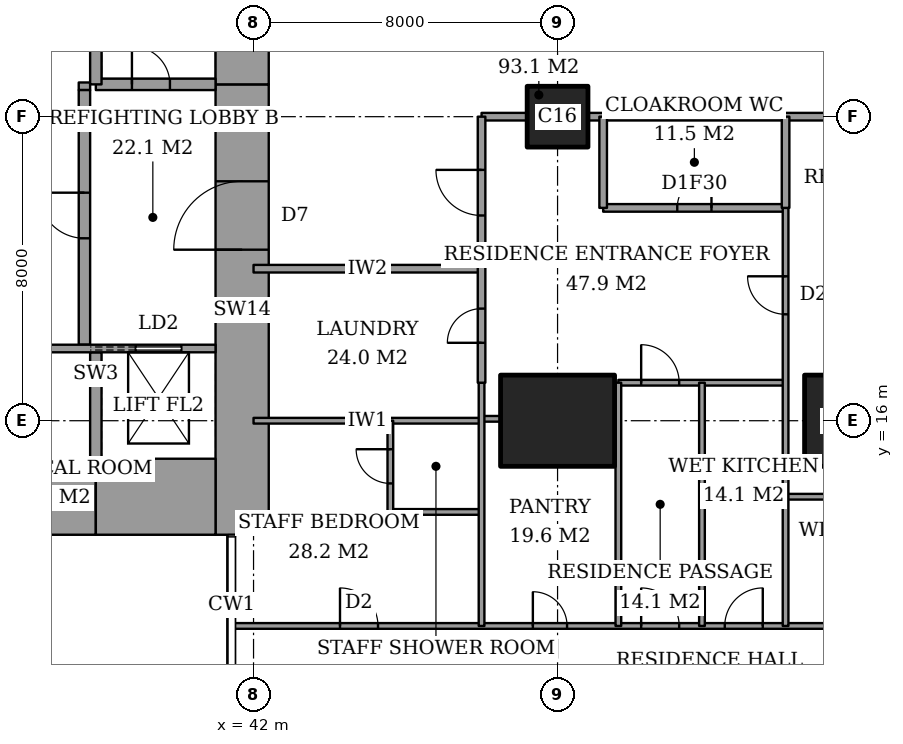
"""IFC4 building model, lengths in metres.
Left out: names, types, materials, properties, quantities, classifications, styles, units other than length and angle.
Written with IfcOpenShell. Run it as: python <this file> out.ifc"""

import sys

from ifc_helpers import new_model, si_unit, direction, frame, frame_2d, origin, origin_2d, place, context, subcontext, project, spatial, rectangle, extrude, element, fill, save


model = new_model("IFC4")
c1 = context("Model", 3, precision=1e-05, world=origin(), true_north=direction((0.0, 1.0)))
c2 = subcontext(c1, "Body", "Model", "MODEL_VIEW")
j1 = project(units=[si_unit("LENGTHUNIT", "METRE"), si_unit("PLANEANGLEUNIT", "RADIAN")], contexts=[c1])
p1 = place(None, origin())
s1 = spatial("IfcSite", under=j1, at=p1, CompositionType="ELEMENT")
p2 = place(p1, origin())
s2 = spatial("IfcBuilding", under=s1, at=p2, CompositionType="ELEMENT")
p3 = place(p2, frame((0.0, 0.0, 273.6)))
s3 = spatial("IfcBuildingStorey", under=s2, at=p3, CompositionType="ELEMENT", Elevation=273.6)
p4 = place(p3, frame((50.0, 16.0, 0.0), z_axis=(0.0, 0.0, 1.0), x_axis=(1.0, 0.0, 0.0)))
e1 = element("IfcColumn", 1, at=p4, inside=s3, PredefinedType="COLUMN", context=c2, shape_type="SweptSolid", body=[
    extrude(rectangle(XDim=3.0, YDim=2.4, at=origin_2d()), origin(), (0.0, 0.0, 1.0), 3.6),
])
p5 = place(p3, frame((50.0, 24.0, 0.0), z_axis=(0.0, 0.0, 1.0), x_axis=(1.0, 0.0, 0.0)))
e2 = element("IfcColumn", 2, at=p5, inside=s3, PredefinedType="COLUMN", context=c2, shape_type="SweptSolid", body=[
    extrude(rectangle(XDim=1.6, YDim=1.6, at=origin_2d()), origin(), (0.0, 0.0, 1.0), 3.6),
])
p6 = place(p3, frame((58.0, 16.0, 0.0), z_axis=(0.0, 0.0, 1.0), x_axis=(1.0, 0.0, 0.0)))
e3 = element("IfcColumn", 3, at=p6, inside=s3, PredefinedType="COLUMN", context=c2, shape_type="SweptSolid", body=[
    extrude(rectangle(XDim=3.0, YDim=2.4, at=origin_2d()), origin(), (0.0, 0.0, 1.0), 3.6),
])
p7 = place(p3, frame((28.15, 14.0, 0.0), z_axis=(0.0, 0.0, 1.0), x_axis=(1.0, 0.0, 0.0)))
e4 = element("IfcWall", 4, at=p7, inside=s3, PredefinedType="SHEAR", context=c2, shape_type="SweptSolid", body=[
    extrude(rectangle(XDim=9.7, YDim=2.0, at=frame_2d((4.85, 0.0))), origin(), (0.0, 0.0, 1.0), 3.6),
])
p8 = place(p3, frame((37.85, 14.0, 0.0), z_axis=(0.0, 0.0, 1.0), x_axis=(1.0, 0.0, 0.0)))
e5 = element("IfcWall", 5, at=p8, inside=s3, PredefinedType="SHEAR", context=c2, shape_type="SweptSolid", body=[
    extrude(rectangle(XDim=3.15, YDim=2.0, at=frame_2d((1.575, 0.0))), origin(), (0.0, 0.0, 1.0), 3.6),
])
p9 = place(p3, frame((41.7, 13.0, 0.0), z_axis=(0.0, 0.0, 1.0), x_axis=(0.0, 1.0, 0.0)))
e6 = element("IfcWall", 6, at=p9, inside=s3, PredefinedType="SHEAR", context=c2, shape_type="SweptSolid", body=[
    extrude(rectangle(XDim=11.85, YDim=1.4, at=frame_2d((5.925, 0.0))), origin(), (0.0, 0.0, 1.0), 3.6),
])
p10 = place(p9, frame((7.5, 0.0, 0.0)))
e7 = element("IfcOpeningElement", 7, at=p10, cuts=e6, PredefinedType="OPENING", context=c2, shape_type="SweptSolid", body=[
    extrude(rectangle(XDim=1.8, YDim=2.4, at=frame_2d((0.9, 1.2))), frame((0.0, 0.71, 0.0), z_axis=(0.0, -1.0, 0.0), x_axis=(1.0, 0.0, 0.0)), (0.0, 0.0, 1.0), 1.42),
])
p11 = place(p3, frame((41.7, 24.85, 0.0), z_axis=(0.0, 0.0, 1.0), x_axis=(0.0, 1.0, 0.0)))
e8 = element("IfcWall", 8, at=p11, inside=s3, PredefinedType="SHEAR", context=c2, shape_type="SweptSolid", body=[
    extrude(rectangle(XDim=10.15, YDim=1.4, at=frame_2d((5.075, 0.0))), origin(), (0.0, 0.0, 1.0), 3.6),
])
p12 = place(p3, frame((37.85, 24.85, 0.0), z_axis=(0.0, 0.0, 1.0), x_axis=(0.0, 1.0, 0.0)))
e9 = element("IfcWall", 9, at=p12, inside=s3, PredefinedType="SHEAR", context=c2, shape_type="SweptSolid", body=[
    extrude(rectangle(XDim=8.15, YDim=0.3, at=frame_2d((4.075, 0.0))), origin(), (0.0, 0.0, 1.0), 3.6),
])
p13 = place(p3, frame((37.85, 24.85, 0.0), z_axis=(0.0, 0.0, 1.0), x_axis=(1.0, 0.0, 0.0)))
e10 = element("IfcWall", 10, at=p13, inside=s3, PredefinedType="SHEAR", context=c2, shape_type="SweptSolid", body=[
    extrude(rectangle(XDim=3.15, YDim=0.3, at=frame_2d((1.575, 0.0))), origin(), (0.0, 0.0, 1.0), 3.6),
])
p14 = place(p13, frame((0.95, 0.0, 0.0)))
e11 = element("IfcOpeningElement", 11, at=p14, cuts=e10, PredefinedType="OPENING", context=c2, shape_type="SweptSolid", body=[
    extrude(rectangle(XDim=1.0, YDim=2.1, at=frame_2d((0.5, 1.05))), frame((0.0, 0.16, 0.0), z_axis=(0.0, -1.0, 0.0), x_axis=(1.0, 0.0, 0.0)), (0.0, 0.0, 1.0), 0.32),
])
p15 = place(p3, frame((37.55, 18.0, 0.0), z_axis=(0.0, 0.0, 1.0), x_axis=(0.0, 1.0, 0.0)))
e12 = element("IfcWall", 12, at=p15, inside=s3, PredefinedType="PARTITIONING", context=c2, shape_type="SweptSolid", body=[
    extrude(rectangle(XDim=6.7, YDim=0.3, at=frame_2d((3.35, 0.0))), origin(), (0.0, 0.0, 1.0), 3.6),
])
p16 = place(p15, frame((2.8, 0.0, 0.0)))
e13 = element("IfcOpeningElement", 13, at=p16, cuts=e12, PredefinedType="OPENING", context=c2, shape_type="SweptSolid", body=[
    extrude(rectangle(XDim=1.2, YDim=2.1, at=frame_2d((0.6, 1.05))), frame((0.0, 0.16, 0.0), z_axis=(0.0, -1.0, 0.0), x_axis=(1.0, 0.0, 0.0)), (0.0, 0.0, 1.0), 0.32),
])
p17 = place(p3, frame((41.439, 10.6, 0.0), z_axis=(0.0, 0.0, 1.0), x_axis=(1.0, 0.0, 0.0)))
e14 = element("IfcWall", 14, at=p17, inside=s3, PredefinedType="PARTITIONING", context=c2, shape_type="SweptSolid", body=[
    extrude(rectangle(XDim=25.011, YDim=0.15, at=frame_2d((12.505, 0.0))), origin(), (0.0, 0.0, 1.0), 3.25),
])
p18 = place(p17, frame((10.761, 0.0, 0.0)))
e15 = element("IfcOpeningElement", 15, at=p18, cuts=e14, PredefinedType="OPENING", context=c2, shape_type="SweptSolid", body=[
    extrude(rectangle(XDim=1.0, YDim=2.1, at=frame_2d((0.5, 1.05))), frame((0.0, 0.085, 0.0), z_axis=(0.0, -1.0, 0.0), x_axis=(1.0, 0.0, 0.0)), (0.0, 0.0, 1.0), 0.17),
])
p19 = place(p17, frame((20.924, 0.0, 0.0)))
e16 = element("IfcOpeningElement", 16, at=p19, cuts=e14, PredefinedType="OPENING", context=c2, shape_type="SweptSolid", body=[
    extrude(rectangle(XDim=1.0, YDim=2.1, at=frame_2d((0.5, 1.05))), frame((0.0, 0.085, 0.0), z_axis=(0.0, -1.0, 0.0), x_axis=(1.0, 0.0, 0.0)), (0.0, 0.0, 1.0), 0.17),
])
p20 = place(p17, frame((15.749, 0.0, 0.0)))
e17 = element("IfcOpeningElement", 17, at=p20, cuts=e14, PredefinedType="OPENING", context=c2, shape_type="SweptSolid", body=[
    extrude(rectangle(XDim=0.9, YDim=2.1, at=frame_2d((0.45, 1.05))), frame((0.0, 0.085, 0.0), z_axis=(0.0, -1.0, 0.0), x_axis=(1.0, 0.0, 0.0)), (0.0, 0.0, 1.0), 0.17),
])
p21 = place(p17, frame((12.961, 0.0, 0.0)))
e18 = element("IfcOpeningElement", 18, at=p21, cuts=e14, PredefinedType="OPENING", context=c2, shape_type="SweptSolid", body=[
    extrude(rectangle(XDim=1.0, YDim=2.1, at=frame_2d((0.5, 1.05))), frame((0.0, 0.085, 0.0), z_axis=(0.0, -1.0, 0.0), x_axis=(1.0, 0.0, 0.0)), (0.0, 0.0, 1.0), 0.17),
])
p22 = place(p17, frame((7.911, 0.0, 0.0)))
e19 = element("IfcOpeningElement", 19, at=p22, cuts=e14, PredefinedType="OPENING", context=c2, shape_type="SweptSolid", body=[
    extrude(rectangle(XDim=0.9, YDim=2.1, at=frame_2d((0.45, 1.05))), frame((0.0, 0.085, 0.0), z_axis=(0.0, -1.0, 0.0), x_axis=(1.0, 0.0, 0.0)), (0.0, 0.0, 1.0), 0.17),
])
p23 = place(p17, frame((2.836, 0.0, 0.0)))
e20 = element("IfcOpeningElement", 20, at=p23, cuts=e14, PredefinedType="OPENING", context=c2, shape_type="SweptSolid", body=[
    extrude(rectangle(XDim=1.0, YDim=2.1, at=frame_2d((0.5, 1.05))), frame((0.0, 0.085, 0.0), z_axis=(0.0, -1.0, 0.0), x_axis=(1.0, 0.0, 0.0)), (0.0, 0.0, 1.0), 0.17),
])
p24 = place(p3, frame((45.6, 13.6, 0.0), z_axis=(0.0, 0.0, 1.0), x_axis=(1.0, 0.0, 0.0)))
e21 = element("IfcWall", 21, at=p24, inside=s3, PredefinedType="PARTITIONING", context=c2, shape_type="SweptSolid", body=[
    extrude(rectangle(XDim=2.4, YDim=0.15, at=frame_2d((1.2, 0.0))), origin(), (0.0, 0.0, 1.0), 3.25),
])
p25 = place(p3, frame((56.0, 14.0, 0.0), z_axis=(0.0, 0.0, 1.0), x_axis=(1.0, 0.0, 0.0)))
e22 = element("IfcWall", 22, at=p25, inside=s3, PredefinedType="PARTITIONING", context=c2, shape_type="SweptSolid", body=[
    extrude(rectangle(XDim=3.275, YDim=0.15, at=frame_2d((1.637, 0.0))), origin(), (0.0, 0.0, 1.0), 3.25),
])
p26 = place(p3, frame((42.0, 16.0, 0.0), z_axis=(0.0, 0.0, 1.0), x_axis=(1.0, 0.0, 0.0)))
e23 = element("IfcWall", 23, at=p26, inside=s3, PredefinedType="PARTITIONING", context=c2, shape_type="SweptSolid", body=[
    extrude(rectangle(XDim=6.0, YDim=0.15, at=frame_2d((3.0, 0.0))), origin(), (0.0, 0.0, 1.0), 3.25),
])
p27 = place(p3, frame((48.0, 16.05, 0.0), z_axis=(0.0, 0.0, 1.0), x_axis=(1.0, 0.0, 0.0)))
e24 = element("IfcWall", 24, at=p27, inside=s3, PredefinedType="PARTITIONING", context=c2, shape_type="SweptSolid", body=[
    extrude(rectangle(XDim=0.5, YDim=0.15, at=frame_2d((0.25, 0.0))), origin(), (0.0, 0.0, 1.0), 3.25),
])
p28 = place(p3, frame((51.6, 17.0, 0.0), z_axis=(0.0, 0.0, 1.0), x_axis=(1.0, 0.0, 0.0)))
e25 = element("IfcWall", 25, at=p28, inside=s3, PredefinedType="PARTITIONING", context=c2, shape_type="SweptSolid", body=[
    extrude(rectangle(XDim=4.4, YDim=0.15, at=frame_2d((2.2, 0.0))), origin(), (0.0, 0.0, 1.0), 3.25),
])
p29 = place(p28, frame((0.6, 0.0, 0.0)))
e26 = element("IfcOpeningElement", 26, at=p29, cuts=e25, PredefinedType="OPENING", context=c2, shape_type="SweptSolid", body=[
    extrude(rectangle(XDim=1.0, YDim=2.1, at=frame_2d((0.5, 1.05))), frame((0.0, 0.085, 0.0), z_axis=(0.0, -1.0, 0.0), x_axis=(1.0, 0.0, 0.0)), (0.0, 0.0, 1.0), 0.17),
])
p30 = place(p3, frame((42.0, 20.0, 0.0), z_axis=(0.0, 0.0, 1.0), x_axis=(1.0, 0.0, 0.0)))
e27 = element("IfcWall", 27, at=p30, inside=s3, PredefinedType="PARTITIONING", context=c2, shape_type="SweptSolid", body=[
    extrude(rectangle(XDim=6.0, YDim=0.2, at=frame_2d((3.0, 0.0))), origin(), (0.0, 0.0, 1.0), 3.25),
])
p31 = place(p3, frame((51.2, 21.6, 0.0), z_axis=(0.0, 0.0, 1.0), x_axis=(1.0, 0.0, 0.0)))
e28 = element("IfcWall", 28, at=p31, inside=s3, PredefinedType="PARTITIONING", context=c2, shape_type="SweptSolid", body=[
    extrude(rectangle(XDim=4.8, YDim=0.2, at=frame_2d((2.4, 0.0))), origin(), (0.0, 0.0, 1.0), 3.25),
])
p32 = place(p31, frame((1.95, 0.0, 0.0)))
e29 = element("IfcOpeningElement", 29, at=p32, cuts=e28, PredefinedType="OPENING", context=c2, shape_type="SweptSolid", body=[
    extrude(rectangle(XDim=0.9, YDim=2.1, at=frame_2d((0.45, 1.05))), frame((0.0, 0.11, 0.0), z_axis=(0.0, -1.0, 0.0), x_axis=(1.0, 0.0, 0.0)), (0.0, 0.0, 1.0), 0.22),
])
p33 = place(p3, frame((48.0, 24.0, 0.0), z_axis=(0.0, 0.0, 1.0), x_axis=(1.0, 0.0, 0.0)))
e30 = element("IfcWall", 30, at=p33, inside=s3, PredefinedType="PARTITIONING", context=c2, shape_type="SweptSolid", body=[
    extrude(rectangle(XDim=1.2, YDim=0.2, at=frame_2d((0.6, 0.0))), origin(), (0.0, 0.0, 1.0), 3.25),
])
p34 = place(p3, frame((50.8, 24.0, 0.0), z_axis=(0.0, 0.0, 1.0), x_axis=(1.0, 0.0, 0.0)))
e31 = element("IfcWall", 31, at=p34, inside=s3, PredefinedType="PARTITIONING", context=c2, shape_type="SweptSolid", body=[
    extrude(rectangle(XDim=6.4, YDim=0.2, at=frame_2d((3.2, 0.0))), origin(), (0.0, 0.0, 1.0), 3.25),
])
p35 = place(p3, frame((45.6, 13.6, 0.0), z_axis=(0.0, 0.0, 1.0), x_axis=(0.0, 1.0, 0.0)))
e32 = element("IfcWall", 32, at=p35, inside=s3, PredefinedType="PARTITIONING", context=c2, shape_type="SweptSolid", body=[
    extrude(rectangle(XDim=2.4, YDim=0.15, at=frame_2d((1.2, 0.0))), origin(), (0.0, 0.0, 1.0), 3.25),
])
p36 = place(p35, frame((0.75, 0.0, 0.0)))
e33 = element("IfcOpeningElement", 33, at=p36, cuts=e32, PredefinedType="OPENING", context=c2, shape_type="SweptSolid", body=[
    extrude(rectangle(XDim=0.9, YDim=2.1, at=frame_2d((0.45, 1.05))), frame((0.0, 0.085, 0.0), z_axis=(0.0, -1.0, 0.0), x_axis=(1.0, 0.0, 0.0)), (0.0, 0.0, 1.0), 0.17),
])
p37 = place(p3, frame((48.0, 17.0, 0.0), z_axis=(0.0, 0.0, 1.0), x_axis=(0.0, 1.0, 0.0)))
e34 = element("IfcWall", 34, at=p37, inside=s3, PredefinedType="PARTITIONING", context=c2, shape_type="SweptSolid", body=[
    extrude(rectangle(XDim=7.0, YDim=0.2, at=frame_2d((3.5, 0.0))), origin(), (0.0, 0.0, 1.0), 3.25),
])
p38 = place(p37, frame((4.4, 0.0, 0.0)))
e35 = element("IfcOpeningElement", 35, at=p38, cuts=e34, PredefinedType="OPENING", context=c2, shape_type="SweptSolid", body=[
    extrude(rectangle(XDim=1.2, YDim=2.4, at=frame_2d((0.6, 1.2))), frame((0.0, 0.11, 0.0), z_axis=(0.0, -1.0, 0.0), x_axis=(1.0, 0.0, 0.0)), (0.0, 0.0, 1.0), 0.22),
])
p39 = place(p37, frame((1.05, 0.0, 0.0)))
e36 = element("IfcOpeningElement", 36, at=p39, cuts=e34, PredefinedType="OPENING", context=c2, shape_type="SweptSolid", body=[
    extrude(rectangle(XDim=0.9, YDim=2.1, at=frame_2d((0.45, 1.05))), frame((0.0, 0.11, 0.0), z_axis=(0.0, -1.0, 0.0), x_axis=(1.0, 0.0, 0.0)), (0.0, 0.0, 1.0), 0.22),
])
p40 = place(p3, frame((48.0, 10.6, 0.0), z_axis=(0.0, 0.0, 1.0), x_axis=(0.0, 1.0, 0.0)))
e37 = element("IfcWall", 37, at=p40, inside=s3, PredefinedType="PARTITIONING", context=c2, shape_type="SweptSolid", body=[
    extrude(rectangle(XDim=6.4, YDim=0.15, at=frame_2d((3.2, 0.0))), origin(), (0.0, 0.0, 1.0), 3.25),
])
p41 = place(p3, frame((51.2, 21.6, 0.0), z_axis=(0.0, 0.0, 1.0), x_axis=(0.0, 1.0, 0.0)))
e38 = element("IfcWall", 38, at=p41, inside=s3, PredefinedType="PARTITIONING", context=c2, shape_type="SweptSolid", body=[
    extrude(rectangle(XDim=2.4, YDim=0.2, at=frame_2d((1.2, 0.0))), origin(), (0.0, 0.0, 1.0), 3.25),
])
for number, where, z_axis, x_axis in (
    (39, (51.6, 10.6, 0.0), (0.0, 0.0, 1.0), (0.0, 1.0, 0.0)),
    (40, (53.8, 10.6, 0.0), (0.0, 0.0, 1.0), (0.0, 1.0, 0.0)),
):
    element("IfcWall", number, at=place(p3, frame(where, z_axis=z_axis, x_axis=x_axis)), inside=s3, PredefinedType="PARTITIONING", context=c2, shape_type="SweptSolid", body=[
        extrude(rectangle(XDim=6.4, YDim=0.15, at=frame_2d((3.2, 0.0))), origin(), (0.0, 0.0, 1.0), 3.25),
    ])
p42 = place(p3, frame((56.0, 21.6, 0.0), z_axis=(0.0, 0.0, 1.0), x_axis=(0.0, 1.0, 0.0)))
e41 = element("IfcWall", 41, at=p42, inside=s3, PredefinedType="PARTITIONING", context=c2, shape_type="SweptSolid", body=[
    extrude(rectangle(XDim=2.4, YDim=0.2, at=frame_2d((1.2, 0.0))), origin(), (0.0, 0.0, 1.0), 3.25),
])
p43 = place(p3, frame((56.0, 10.6, 0.0), z_axis=(0.0, 0.0, 1.0), x_axis=(0.0, 1.0, 0.0)))
e42 = element("IfcWall", 42, at=p43, inside=s3, PredefinedType="PARTITIONING", context=c2, shape_type="SweptSolid", body=[
    extrude(rectangle(XDim=11.0, YDim=0.15, at=frame_2d((5.5, 0.0))), origin(), (0.0, 0.0, 1.0), 3.25),
])
p44 = place(p43, frame((8.2, 0.0, 0.0)))
e43 = element("IfcOpeningElement", 43, at=p44, cuts=e42, PredefinedType="OPENING", context=c2, shape_type="SweptSolid", body=[
    extrude(rectangle(XDim=1.0, YDim=2.1, at=frame_2d((0.5, 1.05))), frame((0.0, 0.085, 0.0), z_axis=(0.0, -1.0, 0.0), x_axis=(1.0, 0.0, 0.0)), (0.0, 0.0, 1.0), 0.17),
])
p45 = place(p3, frame((28.3, 17.9, 0.0), z_axis=(0.0, 0.0, 1.0), x_axis=(1.0, 0.0, 0.0)))
e44 = element("IfcWall", 44, at=p45, inside=s3, PredefinedType="PARTITIONING", context=c2, shape_type="SweptSolid", body=[
    extrude(rectangle(XDim=12.7, YDim=0.2, at=frame_2d((6.35, 0.0))), origin(), (0.0, 0.0, 1.0), 3.6),
])
p46 = place(p45, frame((1.05, 0.0, 0.0)))
e45 = element("IfcOpeningElement", 45, at=p46, cuts=e44, PredefinedType="OPENING", context=c2, shape_type="SweptSolid", body=[
    extrude(rectangle(XDim=0.9, YDim=2.1, at=frame_2d((0.45, 1.05))), frame((0.0, 0.11, 0.0), z_axis=(0.0, -1.0, 0.0), x_axis=(1.0, 0.0, 0.0)), (0.0, 0.0, 1.0), 0.22),
])
p47 = place(p45, frame((4.2, 0.0, 0.0)))
e46 = element("IfcOpeningElement", 46, at=p47, cuts=e44, PredefinedType="OPENING", context=c2, shape_type="SweptSolid", body=[
    extrude(rectangle(XDim=1.0, YDim=2.1, at=frame_2d((0.5, 1.05))), frame((0.0, 0.11, 0.0), z_axis=(0.0, -1.0, 0.0), x_axis=(1.0, 0.0, 0.0)), (0.0, 0.0, 1.0), 0.22),
])
p48 = place(p45, frame((10.6, 0.0, 0.0)))
e47 = element("IfcOpeningElement", 47, at=p48, cuts=e44, PredefinedType="OPENING", context=c2, shape_type="SweptSolid", body=[
    extrude(rectangle(XDim=1.2, YDim=2.1, at=frame_2d((0.6, 1.05))), frame((0.0, 0.11, 0.0), z_axis=(0.0, -1.0, 0.0), x_axis=(1.0, 0.0, 0.0)), (0.0, 0.0, 1.0), 0.22),
])
p49 = place(p3, frame((37.85, 15.0, 0.0), z_axis=(0.0, 0.0, 1.0), x_axis=(0.0, 1.0, 0.0)))
e48 = element("IfcWall", 48, at=p49, inside=s3, PredefinedType="SHEAR", context=c2, shape_type="SweptSolid", body=[
    extrude(rectangle(XDim=2.8, YDim=0.3, at=frame_2d((1.4, 0.0))), origin(), (0.0, 0.0, 1.0), 3.6),
])
p50 = place(p3, frame((37.4, 24.8, 0.0), z_axis=(0.0, 0.0, 1.0), x_axis=(1.0, 0.0, 0.0)))
e49 = element("IfcWall", 49, at=p50, inside=s3, PredefinedType="PARTITIONING", context=c2, shape_type="SweptSolid", body=[
    extrude(rectangle(XDim=0.3, YDim=0.2, at=frame_2d((0.15, 0.0))), origin(), (0.0, 0.0, 1.0), 3.6),
])
p51 = place(p18, origin())
e50 = element("IfcDoor", 50, at=p51, inside=s3, OperationType="SINGLE_SWING_RIGHT", PredefinedType="DOOR", context=c2, shape_type="SweptSolid", body=[
    extrude(rectangle(XDim=1.0, YDim=2.1, at=frame_2d((0.5, 1.05))), frame((0.0, 0.025, 0.0), z_axis=(0.0, -1.0, 0.0), x_axis=(1.0, 0.0, 0.0)), (0.0, 0.0, 1.0), 0.05),
])
fill(e15, e50)
p52 = place(p44, origin())
e51 = element("IfcDoor", 51, at=p52, inside=s3, OperationType="SINGLE_SWING_LEFT", PredefinedType="DOOR", context=c2, shape_type="SweptSolid", body=[
    extrude(rectangle(XDim=1.0, YDim=2.1, at=frame_2d((0.5, 1.05))), frame((0.0, 0.025, 0.0), z_axis=(0.0, -1.0, 0.0), x_axis=(1.0, 0.0, 0.0)), (0.0, 0.0, 1.0), 0.05),
])
fill(e43, e51)
p53 = place(p32, origin())
e52 = element("IfcDoor", 52, at=p53, inside=s3, OperationType="SINGLE_SWING_LEFT", PredefinedType="DOOR", context=c2, shape_type="SweptSolid", body=[
    extrude(rectangle(XDim=0.9, YDim=2.1, at=frame_2d((0.45, 1.05))), frame((0.0, 0.025, 0.0), z_axis=(0.0, -1.0, 0.0), x_axis=(1.0, 0.0, 0.0)), (0.0, 0.0, 1.0), 0.05),
])
fill(e29, e52)
p54 = place(p38, origin())
e53 = element("IfcDoor", 53, at=p54, inside=s3, OperationType="SINGLE_SWING_LEFT", PredefinedType="DOOR", context=c2, shape_type="SweptSolid", body=[
    extrude(rectangle(XDim=1.2, YDim=2.4, at=frame_2d((0.6, 1.2))), frame((0.0, 0.025, 0.0), z_axis=(0.0, -1.0, 0.0), x_axis=(1.0, 0.0, 0.0)), (0.0, 0.0, 1.0), 0.05),
])
fill(e35, e53)
p55 = place(p21, origin())
e54 = element("IfcDoor", 54, at=p55, inside=s3, OperationType="SINGLE_SWING_LEFT", PredefinedType="DOOR", context=c2, shape_type="SweptSolid", body=[
    extrude(rectangle(XDim=1.0, YDim=2.1, at=frame_2d((0.5, 1.05))), frame((0.0, 0.025, 0.0), z_axis=(0.0, -1.0, 0.0), x_axis=(1.0, 0.0, 0.0)), (0.0, 0.0, 1.0), 0.05),
])
fill(e18, e54)
p56 = place(p29, origin())
e55 = element("IfcDoor", 55, at=p56, inside=s3, OperationType="SINGLE_SWING_RIGHT", PredefinedType="DOOR", context=c2, shape_type="SweptSolid", body=[
    extrude(rectangle(XDim=1.0, YDim=2.1, at=frame_2d((0.5, 1.05))), frame((0.0, 0.025, 0.0), z_axis=(0.0, -1.0, 0.0), x_axis=(1.0, 0.0, 0.0)), (0.0, 0.0, 1.0), 0.05),
])
fill(e26, e55)
p57 = place(p22, origin())
e56 = element("IfcDoor", 56, at=p57, inside=s3, OperationType="SINGLE_SWING_RIGHT", PredefinedType="DOOR", context=c2, shape_type="SweptSolid", body=[
    extrude(rectangle(XDim=0.9, YDim=2.1, at=frame_2d((0.45, 1.05))), frame((0.0, 0.025, 0.0), z_axis=(0.0, -1.0, 0.0), x_axis=(1.0, 0.0, 0.0)), (0.0, 0.0, 1.0), 0.05),
])
fill(e19, e56)
p58 = place(p36, origin())
e57 = element("IfcDoor", 57, at=p58, inside=s3, OperationType="SINGLE_SWING_LEFT", PredefinedType="DOOR", context=c2, shape_type="SweptSolid", body=[
    extrude(rectangle(XDim=0.9, YDim=2.1, at=frame_2d((0.45, 1.05))), frame((0.0, 0.025, 0.0), z_axis=(0.0, -1.0, 0.0), x_axis=(1.0, 0.0, 0.0)), (0.0, 0.0, 1.0), 0.05),
])
fill(e33, e57)
p59 = place(p23, origin())
e58 = element("IfcDoor", 58, at=p59, inside=s3, OperationType="SINGLE_SWING_RIGHT", PredefinedType="DOOR", context=c2, shape_type="SweptSolid", body=[
    extrude(rectangle(XDim=1.0, YDim=2.1, at=frame_2d((0.5, 1.05))), frame((0.0, 0.025, 0.0), z_axis=(0.0, -1.0, 0.0), x_axis=(1.0, 0.0, 0.0)), (0.0, 0.0, 1.0), 0.05),
])
fill(e20, e58)
p60 = place(p39, origin())
e59 = element("IfcDoor", 59, at=p60, inside=s3, OperationType="SINGLE_SWING_RIGHT", PredefinedType="DOOR", context=c2, shape_type="SweptSolid", body=[
    extrude(rectangle(XDim=0.9, YDim=2.1, at=frame_2d((0.45, 1.05))), frame((0.0, 0.025, 0.0), z_axis=(0.0, -1.0, 0.0), x_axis=(1.0, 0.0, 0.0)), (0.0, 0.0, 1.0), 0.05),
])
fill(e36, e59)
p61 = place(p14, origin())
e60 = element("IfcDoor", 60, at=p61, inside=s3, OperationType="SINGLE_SWING_RIGHT", PredefinedType="DOOR", context=c2, shape_type="SweptSolid", body=[
    extrude(rectangle(XDim=1.0, YDim=2.1, at=frame_2d((0.5, 1.05))), frame((0.0, 0.025, 0.0), z_axis=(0.0, -1.0, 0.0), x_axis=(1.0, 0.0, 0.0)), (0.0, 0.0, 1.0), 0.05),
])
fill(e11, e60)
p62 = place(p16, origin())
e61 = element("IfcDoor", 61, at=p62, inside=s3, OperationType="SINGLE_SWING_LEFT", PredefinedType="DOOR", context=c2, shape_type="SweptSolid", body=[
    extrude(rectangle(XDim=1.2, YDim=2.1, at=frame_2d((0.6, 1.05))), frame((0.0, 0.025, 0.0), z_axis=(0.0, -1.0, 0.0), x_axis=(1.0, 0.0, 0.0)), (0.0, 0.0, 1.0), 0.05),
])
fill(e13, e61)
p63 = place(p10, origin())
e62 = element("IfcDoor", 62, at=p63, inside=s3, OperationType="DOUBLE_DOOR_DOUBLE_SWING", PredefinedType="DOOR", context=c2, shape_type="SweptSolid", body=[
    extrude(rectangle(XDim=1.8, YDim=2.4, at=frame_2d((0.9, 1.2))), frame((0.0, 0.025, 0.0), z_axis=(0.0, -1.0, 0.0), x_axis=(1.0, 0.0, 0.0)), (0.0, 0.0, 1.0), 0.05),
])
fill(e7, e62)
p64 = place(p48, origin())
e63 = element("IfcDoor", 63, at=p64, inside=s3, OperationType="SLIDING_TO_LEFT", PredefinedType="DOOR", context=c2, shape_type="SweptSolid", body=[
    extrude(rectangle(XDim=1.2, YDim=2.1, at=frame_2d((0.6, 1.05))), frame((0.0, 0.025, 0.0), z_axis=(0.0, -1.0, 0.0), x_axis=(1.0, 0.0, 0.0)), (0.0, 0.0, 1.0), 0.05),
])
fill(e47, e63)
save(model, sys.argv[1])
